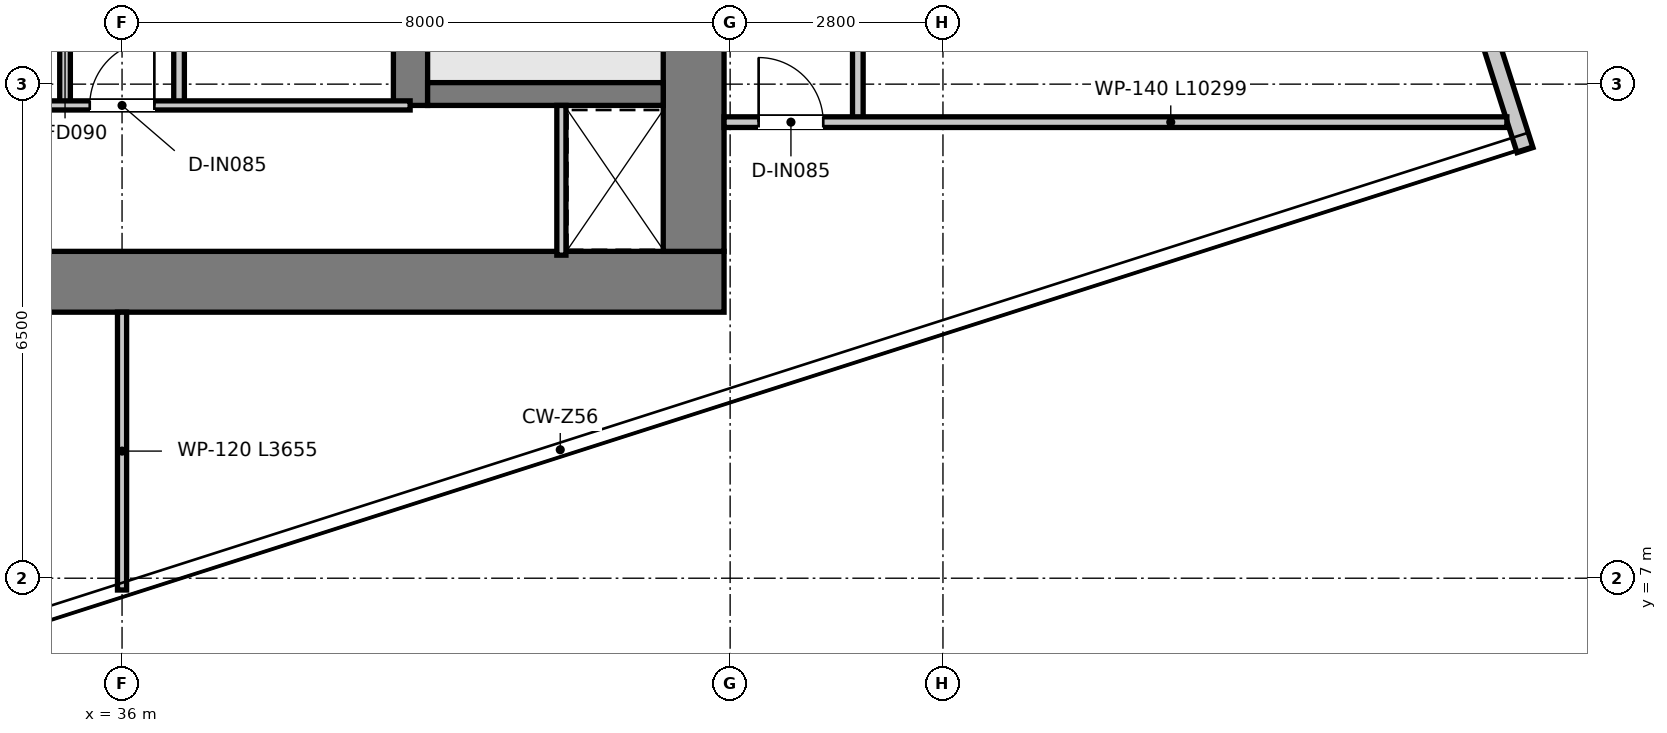
"""IFC4 building model, lengths in metres.
Left out: names, types, materials, properties, quantities, classifications, styles, units other than length and angle.
Written with IfcOpenShell. Run it as: python <this file> out.ifc"""

import sys

from ifc_helpers import new_model, si_unit, direction, frame, frame_2d, origin, place, context, subcontext, project, spatial, rectangle, extrude, element, fill, save


model = new_model("IFC4")
c1 = context("Model", 3, precision=1e-05, world=origin(), true_north=direction((0.0, 1.0)))
c2 = subcontext(c1, "Body", "Model", "MODEL_VIEW")
j1 = project(units=[si_unit("LENGTHUNIT", "METRE"), si_unit("PLANEANGLEUNIT", "RADIAN")], contexts=[c1])
p1 = place(None, origin())
s1 = spatial("IfcSite", under=j1, at=p1, CompositionType="ELEMENT")
p2 = place(p1, origin())
s2 = spatial("IfcBuilding", under=s1, at=p2, CompositionType="ELEMENT")
p3 = place(p2, frame((0.0, 0.0, 339.55)))
s3 = spatial("IfcBuildingStorey", under=s2, at=p3, CompositionType="ELEMENT", Elevation=339.55)
p4 = place(p3, frame((28.08, 10.9, 0.0), z_axis=(0.0, 0.0, 1.0), x_axis=(1.0, 0.0, 0.0)))
e1 = element("IfcWall", 1, at=p4, inside=s3, PredefinedType="SHEAR", context=c2, shape_type="SweptSolid", body=[
    extrude(rectangle(XDim=15.84, YDim=0.8, at=frame_2d((7.92, 0.0))), origin(), (0.0, 0.0, 1.0), 3.95),
])
p5 = place(p3, frame((43.52, 11.3, 0.0), z_axis=(0.0, 0.0, 1.0), x_axis=(0.0, 1.0, 0.0)))
e2 = element("IfcWall", 2, at=p5, inside=s3, PredefinedType="SHEAR", context=c2, shape_type="SweptSolid", body=[
    extrude(rectangle(XDim=14.7, YDim=0.8, at=frame_2d((7.35, 0.0))), origin(), (0.0, 0.0, 1.0), 3.95),
])
p6 = place(p3, frame((39.795, 13.22, 0.0), z_axis=(0.0, 0.0, 1.0), x_axis=(0.0, 1.0, 0.0)))
e3 = element("IfcWall", 3, at=p6, inside=s3, PredefinedType="SHEAR", context=c2, shape_type="SweptSolid", body=[
    extrude(rectangle(XDim=12.78, YDim=0.45, at=frame_2d((6.39, 0.0))), origin(), (0.0, 0.0, 1.0), 3.95),
])
p7 = place(p6, frame((10.58, 0.0, 0.0)))
e4 = element("IfcOpeningElement", 4, at=p7, cuts=e3, PredefinedType="OPENING", context=c2, shape_type="SweptSolid", body=[
    extrude(rectangle(XDim=1.1, YDim=2.15, at=frame_2d((0.55, 1.075))), frame((0.0, 0.235, 0.0), z_axis=(0.0, -1.0, 0.0), x_axis=(1.0, 0.0, 0.0)), (0.0, 0.0, 1.0), 0.47),
])
p8 = place(p3, frame((40.02, 13.37, 0.0), z_axis=(0.0, 0.0, 1.0), x_axis=(1.0, 0.0, 0.0)))
e5 = element("IfcWall", 5, at=p8, inside=s3, PredefinedType="SHEAR", context=c2, shape_type="SweptSolid", body=[
    extrude(rectangle(XDim=3.1, YDim=0.3, at=frame_2d((1.55, 0.0))), origin(), (0.0, 0.0, 1.0), 3.95),
])
p9 = place(p3, frame((54.457, 12.632, 0.0), z_axis=(0.0, 0.0, 1.0), x_axis=(-0.304839382122, 0.952403775248, 0.0)))
e6 = element("IfcWall", 6, at=p9, inside=s3, PredefinedType="ELEMENTEDWALL", context=c2, shape_type="SweptSolid", body=[
    extrude(rectangle(XDim=5.845, YDim=0.22, at=frame_2d((2.922, 0.0))), origin(), (0.0, 0.0, 1.0), 3.67),
])
p10 = place(p3, frame((35.25, 13.22, 0.0), z_axis=(0.0, 0.0, 1.0), x_axis=(0.0, 1.0, 0.0)))
e7 = element("IfcWall", 7, at=p10, inside=s3, PredefinedType="PARTITIONING", context=c2, shape_type="SweptSolid", body=[
    extrude(rectangle(XDim=4.56, YDim=0.14, at=frame_2d((2.28, 0.0))), origin(), (0.0, 0.0, 1.0), 3.67),
])
p11 = place(p10, frame((1.93, 0.0, 0.0)))
e8 = element("IfcOpeningElement", 8, at=p11, cuts=e7, PredefinedType="OPENING", context=c2, shape_type="SweptSolid", body=[
    extrude(rectangle(XDim=0.9, YDim=2.1, at=frame_2d((0.45, 1.05))), frame((0.0, 0.08, 0.0), z_axis=(0.0, -1.0, 0.0), x_axis=(1.0, 0.0, 0.0)), (0.0, 0.0, 1.0), 0.16),
])
p12 = place(p3, frame((36.75, 13.22, 0.0), z_axis=(0.0, 0.0, 1.0), x_axis=(0.0, 1.0, 0.0)))
e9 = element("IfcWall", 9, at=p12, inside=s3, PredefinedType="PARTITIONING", context=c2, shape_type="SweptSolid", body=[
    extrude(rectangle(XDim=4.56, YDim=0.14, at=frame_2d((2.28, 0.0))), origin(), (0.0, 0.0, 1.0), 3.67),
])
p13 = place(p12, frame((1.93, 0.0, 0.0)))
e10 = element("IfcOpeningElement", 10, at=p13, cuts=e9, PredefinedType="OPENING", context=c2, shape_type="SweptSolid", body=[
    extrude(rectangle(XDim=0.9, YDim=2.1, at=frame_2d((0.45, 1.05))), frame((0.0, 0.08, 0.0), z_axis=(0.0, -1.0, 0.0), x_axis=(1.0, 0.0, 0.0)), (0.0, 0.0, 1.0), 0.16),
])
p14 = place(p3, frame((41.78, 11.25, 0.0), z_axis=(0.0, 0.0, 1.0), x_axis=(0.0, 1.0, 0.0)))
e11 = element("IfcWall", 11, at=p14, inside=s3, PredefinedType="PARTITIONING", context=c2, shape_type="SweptSolid", body=[
    extrude(rectangle(XDim=1.97, YDim=0.12, at=frame_2d((0.985, 0.0))), origin(), (0.0, 0.0, 1.0), 3.67),
])
p15 = place(p3, frame((32.21, 13.22, 0.0), z_axis=(0.0, 0.0, 1.0), x_axis=(1.0, 0.0, 0.0)))
e12 = element("IfcWall", 12, at=p15, inside=s3, PredefinedType="PARTITIONING", context=c2, shape_type="SweptSolid", body=[
    extrude(rectangle(XDim=7.58, YDim=0.12, at=frame_2d((3.79, 0.0))), origin(), (0.0, 0.0, 1.0), 3.67),
])
p16 = place(p15, frame((3.365, 0.0, 0.0)))
e13 = element("IfcOpeningElement", 13, at=p16, cuts=e12, PredefinedType="OPENING", context=c2, shape_type="SweptSolid", body=[
    extrude(rectangle(XDim=0.85, YDim=2.1, at=frame_2d((0.425, 1.05))), frame((0.0, 0.07, 0.0), z_axis=(0.0, -1.0, 0.0), x_axis=(1.0, 0.0, 0.0)), (0.0, 0.0, 1.0), 0.14),
])
p17 = place(p3, frame((45.68, 13.0, 0.0), z_axis=(0.0, 0.0, 1.0), x_axis=(0.0, 1.0, 0.0)))
e14 = element("IfcWall", 14, at=p17, inside=s3, PredefinedType="PARTITIONING", context=c2, shape_type="SweptSolid", body=[
    extrude(rectangle(XDim=15.66, YDim=0.14, at=frame_2d((7.83, 0.0))), origin(), (0.0, 0.0, 1.0), 3.13),
])
p18 = place(p17, frame((14.3, 0.0, 0.0)))
e15 = element("IfcOpeningElement", 15, at=p18, cuts=e14, PredefinedType="OPENING", context=c2, shape_type="SweptSolid", body=[
    extrude(rectangle(XDim=0.9, YDim=2.1, at=frame_2d((0.45, 1.05))), frame((0.0, 0.08, 0.0), z_axis=(0.0, -1.0, 0.0), x_axis=(1.0, 0.0, 0.0)), (0.0, 0.0, 1.0), 0.16),
])
p19 = place(p17, frame((4.9, 0.0, 0.0)))
e16 = element("IfcOpeningElement", 16, at=p19, cuts=e14, PredefinedType="OPENING", context=c2, shape_type="SweptSolid", body=[
    extrude(rectangle(XDim=0.9, YDim=2.1, at=frame_2d((0.45, 1.05))), frame((0.0, 0.08, 0.0), z_axis=(0.0, -1.0, 0.0), x_axis=(1.0, 0.0, 0.0)), (0.0, 0.0, 1.0), 0.16),
])
p20 = place(p17, frame((8.25, 0.0, 0.0)))
e17 = element("IfcOpeningElement", 17, at=p20, cuts=e14, PredefinedType="OPENING", context=c2, shape_type="SweptSolid", body=[
    extrude(rectangle(XDim=0.9, YDim=2.1, at=frame_2d((0.45, 1.05))), frame((0.0, 0.08, 0.0), z_axis=(0.0, -1.0, 0.0), x_axis=(1.0, 0.0, 0.0)), (0.0, 0.0, 1.0), 0.16),
])
p21 = place(p17, frame((12.06, 0.0, 0.0)))
e18 = element("IfcOpeningElement", 18, at=p21, cuts=e14, PredefinedType="OPENING", context=c2, shape_type="SweptSolid", body=[
    extrude(rectangle(XDim=0.9, YDim=2.1, at=frame_2d((0.45, 1.05))), frame((0.0, 0.08, 0.0), z_axis=(0.0, -1.0, 0.0), x_axis=(1.0, 0.0, 0.0)), (0.0, 0.0, 1.0), 0.16),
])
p22 = place(p3, frame((43.92, 13.0, 0.0), z_axis=(0.0, 0.0, 1.0), x_axis=(1.0, 0.0, 0.0)))
e19 = element("IfcWall", 19, at=p22, inside=s3, PredefinedType="PARTITIONING", context=c2, shape_type="SweptSolid", body=[
    extrude(rectangle(XDim=10.299, YDim=0.14, at=frame_2d((5.149, 0.0))), origin(), (0.0, 0.0, 1.0), 3.18),
])
p23 = place(p22, frame((0.455, 0.0, 0.0)))
e20 = element("IfcOpeningElement", 20, at=p23, cuts=e19, PredefinedType="OPENING", context=c2, shape_type="SweptSolid", body=[
    extrude(rectangle(XDim=0.85, YDim=2.1, at=frame_2d((0.425, 1.05))), frame((0.0, 0.08, 0.0), z_axis=(0.0, -1.0, 0.0), x_axis=(1.0, 0.0, 0.0)), (0.0, 0.0, 1.0), 0.16),
])
p24 = place(p3, frame((36.0, 6.845, 0.0), z_axis=(0.0, 0.0, 1.0), x_axis=(0.0, 1.0, 0.0)))
e21 = element("IfcWall", 21, at=p24, inside=s3, PredefinedType="PARTITIONING", context=c2, shape_type="SweptSolid", body=[
    extrude(rectangle(XDim=3.655, YDim=0.12, at=frame_2d((1.828, 0.0))), origin(), (0.0, 0.0, 1.0), 3.67),
])
p25 = place(p16, origin())
e22 = element("IfcDoor", 22, at=p25, inside=s3, OperationType="SINGLE_SWING_RIGHT", PredefinedType="DOOR", context=c2, shape_type="SweptSolid", body=[
    extrude(rectangle(XDim=0.85, YDim=2.1, at=frame_2d((0.425, 1.05))), frame((0.0, 0.025, 0.0), z_axis=(0.0, -1.0, 0.0), x_axis=(1.0, 0.0, 0.0)), (0.0, 0.0, 1.0), 0.05),
])
fill(e13, e22)
p26 = place(p23, origin())
e23 = element("IfcDoor", 23, at=p26, inside=s3, OperationType="SINGLE_SWING_LEFT", PredefinedType="DOOR", context=c2, shape_type="SweptSolid", body=[
    extrude(rectangle(XDim=0.85, YDim=2.1, at=frame_2d((0.425, 1.05))), frame((0.0, 0.025, 0.0), z_axis=(0.0, -1.0, 0.0), x_axis=(1.0, 0.0, 0.0)), (0.0, 0.0, 1.0), 0.05),
])
fill(e20, e23)
save(model, sys.argv[1])
